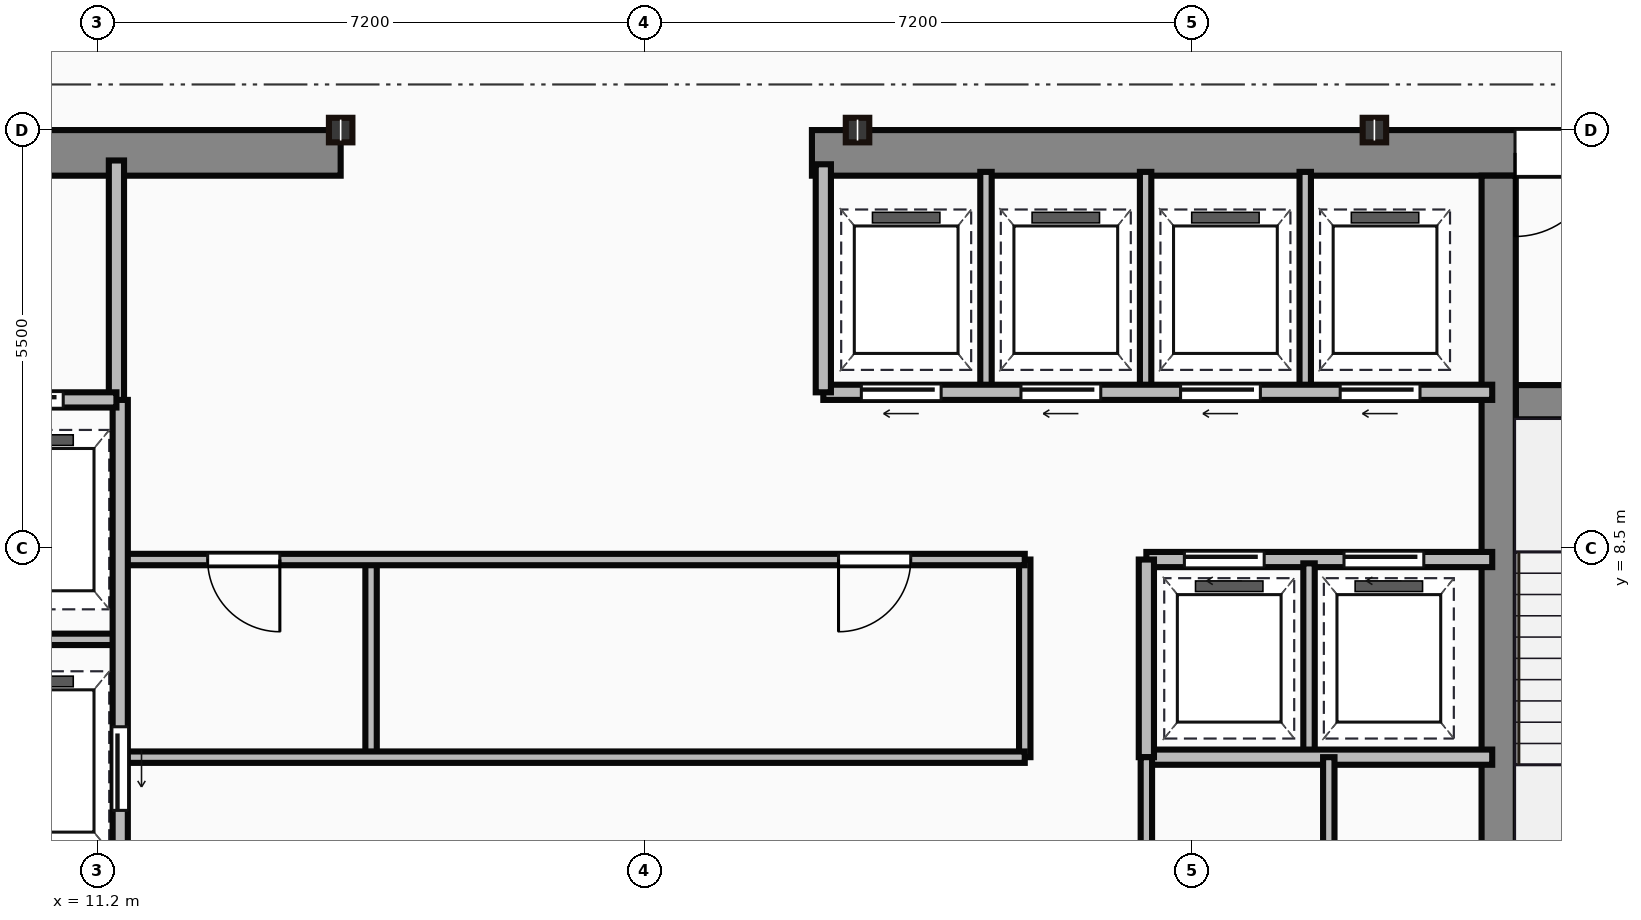
"""IFC4 building model, lengths in metres.
Left out: names, types, materials, properties, quantities, classifications, styles, units other than length and angle.
Written with IfcOpenShell. Run it as: python <this file> out.ifc"""

import sys

from ifc_helpers import new_model, si_unit, direction, frame, frame_2d, origin, origin_2d, place, context, subcontext, project, spatial, rectangle, i_section, extrude, source, transform, mapped, element, fill, save


model = new_model("IFC4")
c1 = context("Model", 3, precision=1e-05, world=origin(), true_north=direction((0.0, 1.0)))
c2 = subcontext(c1, "Body", "Model", "MODEL_VIEW")
j1 = project(units=[si_unit("LENGTHUNIT", "METRE"), si_unit("PLANEANGLEUNIT", "RADIAN")], contexts=[c1])
p1 = place(None, origin())
s1 = spatial("IfcSite", under=j1, at=p1, CompositionType="ELEMENT")
p2 = place(p1, origin())
s2 = spatial("IfcBuilding", under=s1, at=p2, CompositionType="ELEMENT")
p3 = place(p2, frame((0.0, 0.0, 240.55)))
s3 = spatial("IfcBuildingStorey", under=s2, at=p3, CompositionType="ELEMENT", Elevation=240.55)
m1 = source(origin(), c2, "Body", "SweptSolid", [
    extrude(rectangle(XDim=9.1, YDim=0.6, at=frame_2d((4.55, 0.0))), origin(), (0.0, 0.0, 1.0), 3.65),
])
p4 = place(p3, frame((5.3, 13.7, 0.0), z_axis=(0.0, 0.0, 1.0), x_axis=(1.0, 0.0, 0.0)))
e1 = element("IfcWall", 1, at=p4, inside=s3, PredefinedType="SHEAR", context=c2, shape_type="MappedRepresentation", body=[
    mapped(m1, transform((0.0, 0.0, 0.0))),
])
p5 = place(p4, frame((4.1, 0.0, 0.0)))
e2 = element("IfcOpeningElement", 2, at=p5, cuts=e1, PredefinedType="OPENING", context=c2, shape_type="SweptSolid", body=[
    extrude(rectangle(XDim=1.1, YDim=2.15, at=frame_2d((0.55, 1.075))), frame((0.0, 0.31, 0.0), z_axis=(0.0, -1.0, 0.0), x_axis=(1.0, 0.0, 0.0)), (0.0, 0.0, 1.0), 0.62),
])
m2 = source(origin(), c2, "Body", "SweptSolid", [
    extrude(rectangle(XDim=12.6, YDim=0.6, at=frame_2d((6.3, 0.0))), origin(), (0.0, 0.0, 1.0), 3.65),
])
p6 = place(p3, frame((20.6, 13.7, 0.0), z_axis=(0.0, 0.0, 1.0), x_axis=(1.0, 0.0, 0.0)))
e3 = element("IfcWall", 3, at=p6, inside=s3, PredefinedType="SHEAR", context=c2, shape_type="MappedRepresentation", body=[
    mapped(m2, transform((0.0, 0.0, 0.0))),
])
p7 = place(p6, frame((9.25, 0.0, 0.0)))
e4 = element("IfcOpeningElement", 4, at=p7, cuts=e3, PredefinedType="OPENING", context=c2, shape_type="SweptSolid", body=[
    extrude(rectangle(XDim=1.1, YDim=2.15, at=frame_2d((0.55, 1.075))), frame((0.0, 0.31, 0.0), z_axis=(0.0, -1.0, 0.0), x_axis=(1.0, 0.0, 0.0)), (0.0, 0.0, 1.0), 0.62),
])
m3 = source(origin(), c2, "Body", "SweptSolid", [
    extrude(rectangle(XDim=12.5, YDim=0.45, at=frame_2d((6.25, 0.0))), origin(), (0.0, 0.0, 1.0), 3.65),
])
p8 = place(p3, frame((29.635, 0.9, 0.0), z_axis=(0.0, 0.0, 1.0), x_axis=(0.0, 1.0, 0.0)))
e5 = element("IfcWall", 5, at=p8, inside=s3, PredefinedType="SHEAR", context=c2, shape_type="MappedRepresentation", body=[
    mapped(m3, transform((0.0, 0.0, 0.0))),
])
m4 = source(origin(), c2, "Body", "SweptSolid", [
    extrude(rectangle(XDim=3.39, YDim=0.45, at=frame_2d((1.695, 0.0))), origin(), (0.0, 0.0, 1.0), 3.65),
])
p9 = place(p3, frame((29.86, 10.42, 0.0), z_axis=(0.0, 0.0, 1.0), x_axis=(1.0, 0.0, 0.0)))
e6 = element("IfcWall", 6, at=p9, inside=s3, PredefinedType="SHEAR", context=c2, shape_type="MappedRepresentation", body=[
    mapped(m4, transform((0.0, 0.0, 0.0))),
])
p10 = place(p9, frame((1.1, 0.0, 0.0)))
e7 = element("IfcOpeningElement", 7, at=p10, cuts=e6, PredefinedType="OPENING", context=c2, shape_type="SweptSolid", body=[
    extrude(rectangle(XDim=1.1, YDim=2.15, at=frame_2d((0.55, 1.075))), frame((0.0, 0.235, 0.0), z_axis=(0.0, -1.0, 0.0), x_axis=(1.0, 0.0, 0.0)), (0.0, 0.0, 1.0), 0.47),
])
m5 = source(origin(), c2, "Body", "SweptSolid", [
    extrude(i_section(OverallWidth=0.309, OverallDepth=0.323, WebThickness=0.014, FlangeThickness=0.023, at=origin_2d()), origin(), (0.0, 0.0, 1.0), 3.65),
])
for number, where, z_axis, x_axis in (
    (8, (14.4, 14.0, 0.0), (0.0, 0.0, 1.0), (1.0, 0.0, 0.0)),
    (9, (21.2, 14.0, 0.0), (0.0, 0.0, 1.0), (1.0, 0.0, 0.0)),
    (10, (28.0, 14.0, 0.0), (0.0, 0.0, 1.0), (1.0, 0.0, 0.0)),
):
    element("IfcColumn", number, at=place(p3, frame(where, z_axis=z_axis, x_axis=x_axis)), inside=s3, PredefinedType="COLUMN", context=c2, shape_type="MappedRepresentation", body=[
        mapped(m5, transform((0.0, 0.0, 0.0))),
    ])
m6 = source(origin(), c2, "Body", "SweptSolid", [
    extrude(rectangle(XDim=3.18, YDim=0.2, at=frame_2d((1.59, 0.0))), origin(), (0.0, 0.0, 1.0), 3.4),
])
p11 = place(p3, frame((11.45, 10.42, 0.0), z_axis=(0.0, 0.0, 1.0), x_axis=(0.0, 1.0, 0.0)))
e11 = element("IfcWall", 11, at=p11, inside=s3, PredefinedType="PARTITIONING", context=c2, shape_type="MappedRepresentation", body=[
    mapped(m6, transform((0.0, 0.0, 0.0))),
])
m7 = source(origin(), c2, "Body", "SweptSolid", [
    extrude(rectangle(XDim=2.35, YDim=0.2, at=frame_2d((1.175, 0.0))), origin(), (0.0, 0.0, 1.0), 3.4),
])
p12 = place(p3, frame((9.1, 10.45, 0.0), z_axis=(0.0, 0.0, 1.0), x_axis=(1.0, 0.0, 0.0)))
e12 = element("IfcWall", 12, at=p12, inside=s3, PredefinedType="PARTITIONING", context=c2, shape_type="MappedRepresentation", body=[
    mapped(m7, transform((0.0, 0.0, 0.0))),
])
p13 = place(p12, frame((0.55, 0.0, 0.0)))
e13 = element("IfcOpeningElement", 13, at=p13, cuts=e12, PredefinedType="OPENING", context=c2, shape_type="SweptSolid", body=[
    extrude(rectangle(XDim=1.1, YDim=2.15, at=frame_2d((0.55, 1.075))), frame((0.0, 0.11, 0.0), z_axis=(0.0, -1.0, 0.0), x_axis=(1.0, 0.0, 0.0)), (0.0, 0.0, 1.0), 0.22),
])
m8 = source(origin(), c2, "Body", "SweptSolid", [
    extrude(rectangle(XDim=9.6, YDim=0.2, at=frame_2d((4.8, 0.0))), origin(), (0.0, 0.0, 1.0), 3.4),
])
p14 = place(p3, frame((11.5, 0.85, 0.0), z_axis=(0.0, 0.0, 1.0), x_axis=(0.0, 1.0, 0.0)))
e14 = element("IfcWall", 14, at=p14, inside=s3, PredefinedType="PARTITIONING", context=c2, shape_type="MappedRepresentation", body=[
    mapped(m8, transform((0.0, 0.0, 0.0))),
])
p15 = place(p14, frame((4.2, 0.0, 0.0)))
e15 = element("IfcOpeningElement", 15, at=p15, cuts=e14, PredefinedType="OPENING", context=c2, shape_type="SweptSolid", body=[
    extrude(rectangle(XDim=1.1, YDim=2.15, at=frame_2d((0.55, 1.075))), frame((0.0, 0.11, 0.0), z_axis=(0.0, -1.0, 0.0), x_axis=(1.0, 0.0, 0.0)), (0.0, 0.0, 1.0), 0.22),
])
p16 = place(p14, frame((0.9, 0.0, 0.0)))
e16 = element("IfcOpeningElement", 16, at=p16, cuts=e14, PredefinedType="OPENING", context=c2, shape_type="SweptSolid", body=[
    extrude(rectangle(XDim=1.2, YDim=2.15, at=frame_2d((0.6, 1.075))), frame((0.0, 0.11, 0.0), z_axis=(0.0, -1.0, 0.0), x_axis=(1.0, 0.0, 0.0)), (0.0, 0.0, 1.0), 0.22),
])
m9 = source(origin(), c2, "Body", "SweptSolid", [
    extrude(rectangle(XDim=2.4, YDim=0.15, at=frame_2d((1.2, 0.0))), origin(), (0.0, 0.0, 1.0), 3.4),
])
p17 = place(p3, frame((9.1, 7.3, 0.0), z_axis=(0.0, 0.0, 1.0), x_axis=(1.0, 0.0, 0.0)))
e17 = element("IfcWall", 17, at=p17, inside=s3, PredefinedType="PARTITIONING", context=c2, shape_type="MappedRepresentation", body=[
    mapped(m9, transform((0.0, 0.0, 0.0))),
])
m10 = source(origin(), c2, "Body", "SweptSolid", [
    extrude(rectangle(XDim=11.85, YDim=0.15, at=frame_2d((5.925, 0.0))), origin(), (0.0, 0.0, 1.0), 3.4),
])
p18 = place(p3, frame((11.55, 5.75, 0.0), z_axis=(0.0, 0.0, 1.0), x_axis=(1.0, 0.0, 0.0)))
e18 = element("IfcWall", 18, at=p18, inside=s3, PredefinedType="PARTITIONING", context=c2, shape_type="MappedRepresentation", body=[
    mapped(m10, transform((0.0, 0.0, 0.0))),
])
p19 = place(p3, frame((11.55, 8.35, 0.0), z_axis=(0.0, 0.0, 1.0), x_axis=(1.0, 0.0, 0.0)))
e19 = element("IfcWall", 19, at=p19, inside=s3, PredefinedType="PARTITIONING", context=c2, shape_type="MappedRepresentation", body=[
    mapped(m10, transform((0.0, 0.0, 0.0))),
])
p20 = place(p19, frame((1.1, 0.0, 0.0)))
e20 = element("IfcOpeningElement", 20, at=p20, cuts=e19, PredefinedType="OPENING", context=c2, shape_type="SweptSolid", body=[
    extrude(rectangle(XDim=0.95, YDim=2.15, at=frame_2d((0.475, 1.075))), frame((0.0, 0.085, 0.0), z_axis=(0.0, -1.0, 0.0), x_axis=(1.0, 0.0, 0.0)), (0.0, 0.0, 1.0), 0.17),
])
p21 = place(p19, frame((9.4, 0.0, 0.0)))
e21 = element("IfcOpeningElement", 21, at=p21, cuts=e19, PredefinedType="OPENING", context=c2, shape_type="SweptSolid", body=[
    extrude(rectangle(XDim=0.95, YDim=2.15, at=frame_2d((0.475, 1.075))), frame((0.0, 0.085, 0.0), z_axis=(0.0, -1.0, 0.0), x_axis=(1.0, 0.0, 0.0)), (0.0, 0.0, 1.0), 0.17),
])
m11 = source(origin(), c2, "Body", "SweptSolid", [
    extrude(rectangle(XDim=2.6, YDim=0.15, at=frame_2d((1.3, 0.0))), origin(), (0.0, 0.0, 1.0), 3.4),
])
p22 = place(p3, frame((23.4, 5.75, 0.0), z_axis=(0.0, 0.0, 1.0), x_axis=(0.0, 1.0, 0.0)))
e22 = element("IfcWall", 22, at=p22, inside=s3, PredefinedType="PARTITIONING", context=c2, shape_type="MappedRepresentation", body=[
    mapped(m11, transform((0.0, 0.0, 0.0))),
])
m12 = source(origin(), c2, "Body", "SweptSolid", [
    extrude(rectangle(XDim=2.5, YDim=0.15, at=frame_2d((1.25, 0.0))), origin(), (0.0, 0.0, 1.0), 3.4),
])
p23 = place(p3, frame((14.8, 5.8, 0.0), z_axis=(0.0, 0.0, 1.0), x_axis=(0.0, 1.0, 0.0)))
e23 = element("IfcWall", 23, at=p23, inside=s3, PredefinedType="PARTITIONING", context=c2, shape_type="MappedRepresentation", body=[
    mapped(m12, transform((0.0, 0.0, 0.0))),
])
m13 = source(origin(), c2, "Body", "SweptSolid", [
    extrude(rectangle(XDim=8.8, YDim=0.2, at=frame_2d((4.4, 0.0))), origin(), (0.0, 0.0, 1.0), 3.4),
])
p24 = place(p3, frame((20.75, 10.55, 0.0), z_axis=(0.0, 0.0, 1.0), x_axis=(1.0, 0.0, 0.0)))
e24 = element("IfcWall", 24, at=p24, inside=s3, PredefinedType="PARTITIONING", context=c2, shape_type="MappedRepresentation", body=[
    mapped(m13, transform((0.0, 0.0, 0.0))),
])
p25 = place(p24, frame((0.5, 0.0, 0.0)))
e25 = element("IfcOpeningElement", 25, at=p25, cuts=e24, PredefinedType="OPENING", context=c2, shape_type="SweptSolid", body=[
    extrude(rectangle(XDim=1.05, YDim=2.15, at=frame_2d((0.525, 1.075))), frame((0.0, 0.11, 0.0), z_axis=(0.0, -1.0, 0.0), x_axis=(1.0, 0.0, 0.0)), (0.0, 0.0, 1.0), 0.22),
])
p26 = place(p24, frame((2.6, 0.0, 0.0)))
e26 = element("IfcOpeningElement", 26, at=p26, cuts=e24, PredefinedType="OPENING", context=c2, shape_type="SweptSolid", body=[
    extrude(rectangle(XDim=1.05, YDim=2.15, at=frame_2d((0.525, 1.075))), frame((0.0, 0.11, 0.0), z_axis=(0.0, -1.0, 0.0), x_axis=(1.0, 0.0, 0.0)), (0.0, 0.0, 1.0), 0.22),
])
p27 = place(p24, frame((4.7, 0.0, 0.0)))
e27 = element("IfcOpeningElement", 27, at=p27, cuts=e24, PredefinedType="OPENING", context=c2, shape_type="SweptSolid", body=[
    extrude(rectangle(XDim=1.05, YDim=2.15, at=frame_2d((0.525, 1.075))), frame((0.0, 0.11, 0.0), z_axis=(0.0, -1.0, 0.0), x_axis=(1.0, 0.0, 0.0)), (0.0, 0.0, 1.0), 0.22),
])
p28 = place(p24, frame((6.8, 0.0, 0.0)))
e28 = element("IfcOpeningElement", 28, at=p28, cuts=e24, PredefinedType="OPENING", context=c2, shape_type="SweptSolid", body=[
    extrude(rectangle(XDim=1.05, YDim=2.15, at=frame_2d((0.525, 1.075))), frame((0.0, 0.11, 0.0), z_axis=(0.0, -1.0, 0.0), x_axis=(1.0, 0.0, 0.0)), (0.0, 0.0, 1.0), 0.22),
])
m14 = source(origin(), c2, "Body", "SweptSolid", [
    extrude(rectangle(XDim=3.0, YDim=0.2, at=frame_2d((1.5, 0.0))), origin(), (0.0, 0.0, 1.0), 3.4),
])
p29 = place(p3, frame((20.75, 10.55, 0.0), z_axis=(0.0, 0.0, 1.0), x_axis=(0.0, 1.0, 0.0)))
e29 = element("IfcWall", 29, at=p29, inside=s3, PredefinedType="PARTITIONING", context=c2, shape_type="MappedRepresentation", body=[
    mapped(m14, transform((0.0, 0.0, 0.0))),
])
m15 = source(origin(), c2, "Body", "SweptSolid", [
    extrude(rectangle(XDim=2.85, YDim=0.15, at=frame_2d((1.425, 0.0))), origin(), (0.0, 0.0, 1.0), 3.4),
])
for number, where, z_axis, x_axis in (
    (30, (22.89, 10.6, 0.0), (0.0, 0.0, 1.0), (0.0, 1.0, 0.0)),
    (31, (24.99, 10.6, 0.0), (0.0, 0.0, 1.0), (0.0, 1.0, 0.0)),
    (32, (27.09, 10.6, 0.0), (0.0, 0.0, 1.0), (0.0, 1.0, 0.0)),
):
    element("IfcWall", number, at=place(p3, frame(where, z_axis=z_axis, x_axis=x_axis)), inside=s3, PredefinedType="PARTITIONING", context=c2, shape_type="MappedRepresentation", body=[
        mapped(m15, transform((0.0, 0.0, 0.0))),
    ])
m16 = source(origin(), c2, "Body", "SweptSolid", [
    extrude(rectangle(XDim=4.55, YDim=0.2, at=frame_2d((2.275, 0.0))), origin(), (0.0, 0.0, 1.0), 3.4),
])
p30 = place(p3, frame((25.0, 8.35, 0.0), z_axis=(0.0, 0.0, 1.0), x_axis=(1.0, 0.0, 0.0)))
e33 = element("IfcWall", 33, at=p30, inside=s3, PredefinedType="PARTITIONING", context=c2, shape_type="MappedRepresentation", body=[
    mapped(m16, transform((0.0, 0.0, 0.0))),
])
p31 = place(p30, frame((0.5, 0.0, 0.0)))
e34 = element("IfcOpeningElement", 34, at=p31, cuts=e33, PredefinedType="OPENING", context=c2, shape_type="SweptSolid", body=[
    extrude(rectangle(XDim=1.05, YDim=2.15, at=frame_2d((0.525, 1.075))), frame((0.0, 0.11, 0.0), z_axis=(0.0, -1.0, 0.0), x_axis=(1.0, 0.0, 0.0)), (0.0, 0.0, 1.0), 0.22),
])
p32 = place(p30, frame((2.6, 0.0, 0.0)))
e35 = element("IfcOpeningElement", 35, at=p32, cuts=e33, PredefinedType="OPENING", context=c2, shape_type="SweptSolid", body=[
    extrude(rectangle(XDim=1.05, YDim=2.15, at=frame_2d((0.525, 1.075))), frame((0.0, 0.11, 0.0), z_axis=(0.0, -1.0, 0.0), x_axis=(1.0, 0.0, 0.0)), (0.0, 0.0, 1.0), 0.22),
])
p33 = place(p3, frame((25.0, 5.75, 0.0), z_axis=(0.0, 0.0, 1.0), x_axis=(1.0, 0.0, 0.0)))
e36 = element("IfcWall", 36, at=p33, inside=s3, PredefinedType="PARTITIONING", context=c2, shape_type="MappedRepresentation", body=[
    mapped(m16, transform((0.0, 0.0, 0.0))),
])
m17 = source(origin(), c2, "Body", "SweptSolid", [
    extrude(rectangle(XDim=2.6, YDim=0.2, at=frame_2d((1.3, 0.0))), origin(), (0.0, 0.0, 1.0), 3.4),
])
p34 = place(p3, frame((25.0, 5.75, 0.0), z_axis=(0.0, 0.0, 1.0), x_axis=(0.0, 1.0, 0.0)))
e37 = element("IfcWall", 37, at=p34, inside=s3, PredefinedType="PARTITIONING", context=c2, shape_type="MappedRepresentation", body=[
    mapped(m17, transform((0.0, 0.0, 0.0))),
])
p35 = place(p3, frame((27.14, 5.8, 0.0), z_axis=(0.0, 0.0, 1.0), x_axis=(0.0, 1.0, 0.0)))
e38 = element("IfcWall", 38, at=p35, inside=s3, PredefinedType="PARTITIONING", context=c2, shape_type="MappedRepresentation", body=[
    mapped(m12, transform((0.0, 0.0, 0.0))),
])
m18 = source(origin(), c2, "Body", "SweptSolid", [
    extrude(rectangle(XDim=4.9, YDim=0.15, at=frame_2d((2.45, 0.0))), origin(), (0.0, 0.0, 1.0), 3.4),
])
p36 = place(p3, frame((25.0, 0.85, 0.0), z_axis=(0.0, 0.0, 1.0), x_axis=(0.0, 1.0, 0.0)))
e39 = element("IfcWall", 39, at=p36, inside=s3, PredefinedType="PARTITIONING", context=c2, shape_type="MappedRepresentation", body=[
    mapped(m18, transform((0.0, 0.0, 0.0))),
])
p37 = place(p36, frame((2.5, 0.0, 0.0)))
e40 = element("IfcOpeningElement", 40, at=p37, cuts=e39, PredefinedType="OPENING", context=c2, shape_type="SweptSolid", body=[
    extrude(rectangle(XDim=0.95, YDim=2.15, at=frame_2d((0.475, 1.075))), frame((0.0, 0.085, 0.0), z_axis=(0.0, -1.0, 0.0), x_axis=(1.0, 0.0, 0.0)), (0.0, 0.0, 1.0), 0.17),
])
m19 = source(origin(), c2, "Body", "SweptSolid", [
    extrude(rectangle(XDim=3.4, YDim=0.15, at=frame_2d((1.7, 0.0))), origin(), (0.0, 0.0, 1.0), 3.4),
])
p38 = place(p3, frame((27.4, 2.35, 0.0), z_axis=(0.0, 0.0, 1.0), x_axis=(0.0, 1.0, 0.0)))
e41 = element("IfcWall", 41, at=p38, inside=s3, PredefinedType="PARTITIONING", context=c2, shape_type="MappedRepresentation", body=[
    mapped(m19, transform((0.0, 0.0, 0.0))),
])
p39 = place(p38, frame((1.1, 0.0, 0.0)))
e42 = element("IfcOpeningElement", 42, at=p39, cuts=e41, PredefinedType="OPENING", context=c2, shape_type="SweptSolid", body=[
    extrude(rectangle(XDim=0.85, YDim=2.1, at=frame_2d((0.425, 1.05))), frame((0.0, 0.085, 0.0), z_axis=(0.0, -1.0, 0.0), x_axis=(1.0, 0.0, 0.0)), (0.0, 0.0, 1.0), 0.17),
])
m20 = source(origin(), c2, "Body", "SweptSolid", [
    extrude(rectangle(XDim=1.1, YDim=2.15, at=frame_2d((0.55, 1.075))), frame((0.0, 0.025, 0.0), z_axis=(0.0, -1.0, 0.0), x_axis=(1.0, 0.0, 0.0)), (0.0, 0.0, 1.0), 0.05),
])
p40 = place(p7, origin())
e43 = element("IfcDoor", 43, at=p40, inside=s3, OperationType="SINGLE_SWING_LEFT", PredefinedType="DOOR", context=c2, shape_type="MappedRepresentation", body=[
    mapped(m20, transform((0.0, 0.0, 0.0))),
])
fill(e4, e43)
p41 = place(p13, origin())
e44 = element("IfcDoor", 44, at=p41, inside=s3, OperationType="SLIDING_TO_LEFT", PredefinedType="DOOR", context=c2, shape_type="MappedRepresentation", body=[
    mapped(m20, transform((0.0, 0.0, 0.0))),
])
fill(e13, e44)
p42 = place(p15, frame((1.1, 0.0, 0.0), z_axis=(0.0, 0.0, 1.0), x_axis=(-1.0, 0.0, 0.0)))
e45 = element("IfcDoor", 45, at=p42, inside=s3, OperationType="SLIDING_TO_LEFT", PredefinedType="DOOR", context=c2, shape_type="MappedRepresentation", body=[
    mapped(m20, transform((0.0, 0.0, 0.0))),
])
fill(e15, e45)
m21 = source(origin(), c2, "Body", "SweptSolid", [
    extrude(rectangle(XDim=0.95, YDim=2.15, at=frame_2d((0.475, 1.075))), frame((0.0, 0.025, 0.0), z_axis=(0.0, -1.0, 0.0), x_axis=(1.0, 0.0, 0.0)), (0.0, 0.0, 1.0), 0.05),
])
p43 = place(p20, origin())
e46 = element("IfcDoor", 46, at=p43, inside=s3, OperationType="SINGLE_SWING_RIGHT", PredefinedType="DOOR", context=c2, shape_type="MappedRepresentation", body=[
    mapped(m21, transform((0.0, 0.0, 0.0))),
])
fill(e20, e46)
p44 = place(p21, origin())
e47 = element("IfcDoor", 47, at=p44, inside=s3, OperationType="SINGLE_SWING_LEFT", PredefinedType="DOOR", context=c2, shape_type="MappedRepresentation", body=[
    mapped(m21, transform((0.0, 0.0, 0.0))),
])
fill(e21, e47)
m22 = source(origin(), c2, "Body", "SweptSolid", [
    extrude(rectangle(XDim=1.05, YDim=2.15, at=frame_2d((0.525, 1.075))), frame((0.0, 0.025, 0.0), z_axis=(0.0, -1.0, 0.0), x_axis=(1.0, 0.0, 0.0)), (0.0, 0.0, 1.0), 0.05),
])
p45 = place(p25, frame((1.05, 0.0, 0.0), z_axis=(0.0, 0.0, 1.0), x_axis=(-1.0, 0.0, 0.0)))
e48 = element("IfcDoor", 48, at=p45, inside=s3, OperationType="SLIDING_TO_LEFT", PredefinedType="DOOR", context=c2, shape_type="MappedRepresentation", body=[
    mapped(m22, transform((0.0, 0.0, 0.0))),
])
fill(e25, e48)
p46 = place(p26, frame((1.05, 0.0, 0.0), z_axis=(0.0, 0.0, 1.0), x_axis=(-1.0, 0.0, 0.0)))
e49 = element("IfcDoor", 49, at=p46, inside=s3, OperationType="SLIDING_TO_LEFT", PredefinedType="DOOR", context=c2, shape_type="MappedRepresentation", body=[
    mapped(m22, transform((0.0, 0.0, 0.0))),
])
fill(e26, e49)
p47 = place(p27, frame((1.05, 0.0, 0.0), z_axis=(0.0, 0.0, 1.0), x_axis=(-1.0, 0.0, 0.0)))
e50 = element("IfcDoor", 50, at=p47, inside=s3, OperationType="SLIDING_TO_LEFT", PredefinedType="DOOR", context=c2, shape_type="MappedRepresentation", body=[
    mapped(m22, transform((0.0, 0.0, 0.0))),
])
fill(e27, e50)
p48 = place(p28, frame((1.05, 0.0, 0.0), z_axis=(0.0, 0.0, 1.0), x_axis=(-1.0, 0.0, 0.0)))
e51 = element("IfcDoor", 51, at=p48, inside=s3, OperationType="SLIDING_TO_LEFT", PredefinedType="DOOR", context=c2, shape_type="MappedRepresentation", body=[
    mapped(m22, transform((0.0, 0.0, 0.0))),
])
fill(e28, e51)
p49 = place(p31, origin())
e52 = element("IfcDoor", 52, at=p49, inside=s3, OperationType="SLIDING_TO_LEFT", PredefinedType="DOOR", context=c2, shape_type="MappedRepresentation", body=[
    mapped(m22, transform((0.0, 0.0, 0.0))),
])
fill(e34, e52)
p50 = place(p32, origin())
e53 = element("IfcDoor", 53, at=p50, inside=s3, OperationType="SLIDING_TO_LEFT", PredefinedType="DOOR", context=c2, shape_type="MappedRepresentation", body=[
    mapped(m22, transform((0.0, 0.0, 0.0))),
])
fill(e35, e53)
save(model, sys.argv[1])
